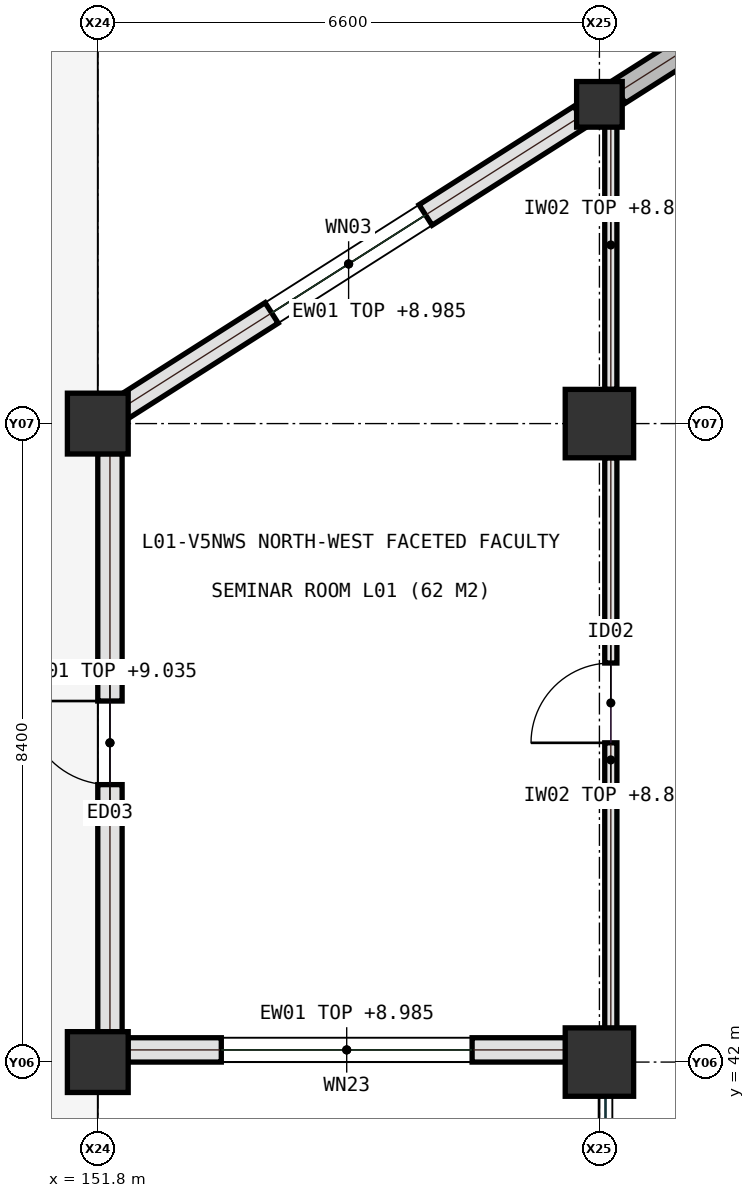
"""IFC4 building model, lengths in metres.
Left out: names, types, materials, properties, quantities, classifications, styles, units other than length and angle.
Written with IfcOpenShell. Run it as: python <this file> out.ifc"""

import sys

from ifc_helpers import new_model, si_unit, direction, frame, frame_2d, origin, origin_2d, place, context, subcontext, project, spatial, rectangle, extrude, element, fill, save


model = new_model("IFC4")
c1 = context("Model", 3, precision=1e-05, world=origin(), true_north=direction((0.0, 1.0)))
c2 = subcontext(c1, "Body", "Model", "MODEL_VIEW")
j1 = project(units=[si_unit("LENGTHUNIT", "METRE"), si_unit("PLANEANGLEUNIT", "RADIAN")], contexts=[c1])
p1 = place(None, origin())
s1 = spatial("IfcSite", under=j1, at=p1, CompositionType="ELEMENT")
p2 = place(p1, origin())
s2 = spatial("IfcBuilding", under=s1, at=p2, CompositionType="ELEMENT")
p3 = place(p2, frame((0.0, 0.0, 5.4)))
s3 = spatial("IfcBuildingStorey", under=s2, at=p3, CompositionType="ELEMENT", Elevation=5.4)
for number, where, z_axis, x_axis in (
    (1, (151.8, 42.0, 0.0), (0.0, 0.0, 1.0), (1.0, 0.0, 0.0)),
    (2, (151.8, 50.4, 0.0), (0.0, 0.0, 1.0), (1.0, 0.0, 0.0)),
):
    element("IfcColumn", number, at=place(p3, frame(where, z_axis=z_axis, x_axis=x_axis)), inside=s3, PredefinedType="COLUMN", context=c2, shape_type="SweptSolid", body=[
        extrude(rectangle(XDim=0.8, YDim=0.8, at=origin_2d()), origin(), (0.0, 0.0, 1.0), 4.5),
    ])
for number, where, z_axis, x_axis in (
    (3, (158.4, 42.0, 0.0), (0.0, 0.0, 1.0), (1.0, 0.0, 0.0)),
    (4, (158.4, 50.4, 0.0), (0.0, 0.0, 1.0), (1.0, 0.0, 0.0)),
):
    element("IfcColumn", number, at=place(p3, frame(where, z_axis=z_axis, x_axis=x_axis)), inside=s3, PredefinedType="COLUMN", context=c2, shape_type="SweptSolid", body=[
        extrude(rectangle(XDim=0.9, YDim=0.9, at=origin_2d()), origin(), (0.0, 0.0, 1.0), 4.5),
    ])
p4 = place(p3, frame((158.4, 54.6, 0.0), z_axis=(0.0, 0.0, 1.0), x_axis=(1.0, 0.0, 0.0)))
e5 = element("IfcColumn", 5, at=p4, inside=s3, PredefinedType="COLUMN", context=c2, shape_type="SweptSolid", body=[
    extrude(rectangle(XDim=0.6, YDim=0.6, at=origin_2d()), origin(), (0.0, 0.0, 1.0), 4.5),
])
p5 = place(p3, frame((158.55, 42.0, 0.0), z_axis=(0.0, 0.0, 1.0), x_axis=(0.0, 1.0, 0.0)))
e6 = element("IfcWall", 6, at=p5, inside=s3, PredefinedType="PARTITIONING", context=c2, shape_type="SweptSolid", body=[
    extrude(rectangle(XDim=7.95, YDim=0.16, at=frame_2d((3.975, 0.0))), origin(), (0.0, 0.0, 1.0), 3.45),
])
p6 = place(p5, frame((4.2, 0.0, 0.0)))
e7 = element("IfcOpeningElement", 7, at=p6, cuts=e6, PredefinedType="OPENING", context=c2, shape_type="SweptSolid", body=[
    extrude(rectangle(XDim=1.05, YDim=2.15, at=frame_2d((0.525, 1.075))), frame((0.0, 0.09, 0.0), z_axis=(0.0, -1.0, 0.0), x_axis=(1.0, 0.0, 0.0)), (0.0, 0.0, 1.0), 0.18),
])
p7 = place(p3, frame((158.55, 50.85, 0.0), z_axis=(0.0, 0.0, 1.0), x_axis=(0.0, 1.0, 0.0)))
e8 = element("IfcWall", 8, at=p7, inside=s3, PredefinedType="PARTITIONING", context=c2, shape_type="SweptSolid", body=[
    extrude(rectangle(XDim=3.8, YDim=0.16, at=frame_2d((1.9, 0.0))), origin(), (0.0, 0.0, 1.0), 3.45),
])
p8 = place(p3, frame((152.195, 42.16, 0.0), z_axis=(0.0, 0.0, 1.0), x_axis=(1.0, 0.0, 0.0)))
e9 = element("IfcWall", 9, at=p8, inside=s3, PredefinedType="SOLIDWALL", context=c2, shape_type="SweptSolid", body=[
    extrude(rectangle(XDim=5.76, YDim=0.32, at=frame_2d((2.88, 0.0))), origin(), (0.0, 0.0, 1.0), 3.585),
])
p9 = place(p8, frame((1.23, 0.0, 1.35)))
e10 = element("IfcOpeningElement", 10, at=p9, cuts=e9, PredefinedType="OPENING", context=c2, shape_type="SweptSolid", body=[
    extrude(rectangle(XDim=3.3, YDim=1.05, at=frame_2d((1.65, 0.525))), frame((0.0, 0.17, 0.0), z_axis=(0.0, -1.0, 0.0), x_axis=(1.0, 0.0, 0.0)), (0.0, 0.0, 1.0), 0.34),
])
p10 = place(p3, frame((151.96, 50.005, 0.0), z_axis=(0.0, 0.0, 1.0), x_axis=(0.0, -1.0, 0.0)))
e11 = element("IfcWall", 11, at=p10, inside=s3, PredefinedType="SOLIDWALL", context=c2, shape_type="SweptSolid", body=[
    extrude(rectangle(XDim=7.61, YDim=0.32, at=frame_2d((3.805, 0.0))), origin(), (0.0, 0.0, 1.0), 3.635),
])
p11 = place(p10, frame((3.255, 0.0, 0.0)))
e12 = element("IfcOpeningElement", 12, at=p11, cuts=e11, PredefinedType="OPENING", context=c2, shape_type="SweptSolid", body=[
    extrude(rectangle(XDim=1.1, YDim=2.2, at=frame_2d((0.55, 1.1))), frame((0.0, 0.17, 0.0), z_axis=(0.0, -1.0, 0.0), x_axis=(1.0, 0.0, 0.0)), (0.0, 0.0, 1.0), 0.34),
])
p12 = place(p3, frame((152.05, 50.56, 0.0), z_axis=(0.0, 0.0, 1.0), x_axis=(0.843776886751, 0.536694107835, 0.0)))
e13 = element("IfcWall", 13, at=p12, inside=s3, PredefinedType="SOLIDWALL", context=c2, shape_type="SweptSolid", body=[
    extrude(rectangle(XDim=7.229, YDim=0.32, at=frame_2d((3.615, 0.0))), origin(), (0.0, 0.0, 1.0), 3.585),
])
p13 = place(p12, frame((2.415, 0.0, 0.95)))
e14 = element("IfcOpeningElement", 14, at=p13, cuts=e13, PredefinedType="OPENING", context=c2, shape_type="SweptSolid", body=[
    extrude(rectangle(XDim=2.4, YDim=1.6, at=frame_2d((1.2, 0.8))), frame((0.0, 0.17, 0.0), z_axis=(0.0, -1.0, 0.0), x_axis=(1.0, 0.0, 0.0)), (0.0, 0.0, 1.0), 0.34),
])
p14 = place(p3, frame((158.65, 54.76, 0.0), z_axis=(0.0, 0.0, 1.0), x_axis=(0.843786613851, 0.536678814829, 0.0)))
e15 = element("IfcWall", 15, at=p14, inside=s3, PredefinedType="SHEAR", context=c2, shape_type="SweptSolid", body=[
    extrude(rectangle(XDim=7.229, YDim=0.34, at=frame_2d((3.615, 0.0))), origin(), (0.0, 0.0, 1.0), 4.2),
])
p15 = place(p6, origin())
e16 = element("IfcDoor", 16, at=p15, inside=s3, OperationType="SINGLE_SWING_LEFT", PredefinedType="DOOR", context=c2, shape_type="SweptSolid", body=[
    extrude(rectangle(XDim=1.05, YDim=2.15, at=frame_2d((0.525, 1.075))), frame((0.0, 0.025, 0.0), z_axis=(0.0, -1.0, 0.0), x_axis=(1.0, 0.0, 0.0)), (0.0, 0.0, 1.0), 0.05),
])
fill(e7, e16)
p16 = place(p9, origin())
e17 = element("IfcWindow", 17, at=p16, inside=s3, PartitioningType="SINGLE_PANEL", PredefinedType="WINDOW", context=c2, shape_type="SweptSolid", body=[
    extrude(rectangle(XDim=3.3, YDim=1.05, at=frame_2d((1.65, 0.525))), frame((0.0, 0.03, 0.0), z_axis=(0.0, -1.0, 0.0), x_axis=(1.0, 0.0, 0.0)), (0.0, 0.0, 1.0), 0.06),
])
fill(e10, e17)
p17 = place(p11, frame((1.1, 0.0, 0.0), z_axis=(0.0, 0.0, 1.0), x_axis=(-1.0, 0.0, 0.0)))
e18 = element("IfcDoor", 18, at=p17, inside=s3, OperationType="SINGLE_SWING_LEFT", PredefinedType="DOOR", context=c2, shape_type="SweptSolid", body=[
    extrude(rectangle(XDim=1.1, YDim=2.2, at=frame_2d((0.55, 1.1))), frame((0.0, 0.025, 0.0), z_axis=(0.0, -1.0, 0.0), x_axis=(1.0, 0.0, 0.0)), (0.0, 0.0, 1.0), 0.05),
])
fill(e12, e18)
p18 = place(p13, origin())
e19 = element("IfcWindow", 19, at=p18, inside=s3, PartitioningType="SINGLE_PANEL", PredefinedType="WINDOW", context=c2, shape_type="SweptSolid", body=[
    extrude(rectangle(XDim=2.4, YDim=1.6, at=frame_2d((1.2, 0.8))), frame((0.0, 0.03, 0.0), z_axis=(0.0, -1.0, 0.0), x_axis=(1.0, 0.0, 0.0)), (0.0, 0.0, 1.0), 0.06),
])
fill(e14, e19)
save(model, sys.argv[1])
